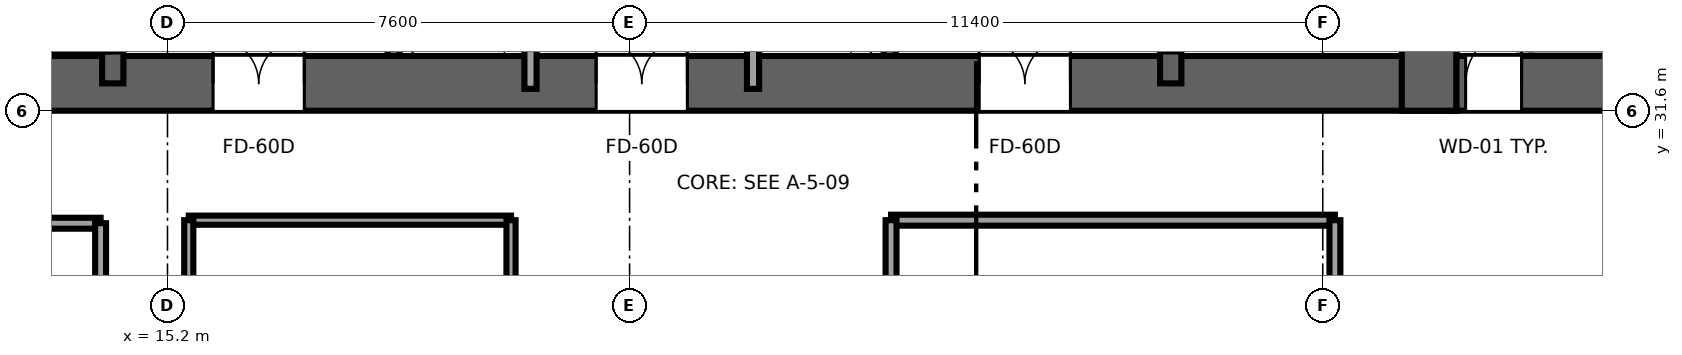
"""IFC4 building model, lengths in metres.
Left out: names, types, materials, properties, quantities, classifications, styles, units other than length and angle.
Written with IfcOpenShell. Run it as: python <this file> out.ifc"""

import sys

from ifc_helpers import new_model, si_unit, direction, frame, frame_2d, origin, place, context, subcontext, project, spatial, rectangle, extrude, source, transform, mapped, element, fill, save


model = new_model("IFC4")
c1 = context("Model", 3, precision=1e-05, world=origin(), true_north=direction((0.0, 1.0)))
c2 = subcontext(c1, "Body", "Model", "MODEL_VIEW")
j1 = project(units=[si_unit("LENGTHUNIT", "METRE"), si_unit("PLANEANGLEUNIT", "RADIAN")], contexts=[c1])
p1 = place(None, origin())
s1 = spatial("IfcSite", under=j1, at=p1, CompositionType="ELEMENT")
p2 = place(p1, origin())
s2 = spatial("IfcBuilding", under=s1, at=p2, CompositionType="ELEMENT")
p3 = place(p2, frame((0.0, 0.0, 32.0)))
s3 = spatial("IfcBuildingStorey", under=s2, at=p3, CompositionType="ELEMENT", Elevation=32.0)
p4 = place(p3, frame((9.6, 32.05, 0.0), z_axis=(0.0, 0.0, 1.0), x_axis=(1.0, 0.0, 0.0)))
e1 = element("IfcWall", 1, at=p4, inside=s3, PredefinedType="SHEAR", context=c2, shape_type="SweptSolid", body=[
    extrude(rectangle(XDim=26.8, YDim=0.9, at=frame_2d((13.4, 0.0))), origin(), (0.0, 0.0, 1.0), 3.55),
])
p5 = place(p4, frame((7.85, 0.0, 0.0), z_axis=(0.0, 0.0, 1.0), x_axis=(-1.0, 0.0, 0.0)))
e2 = element("IfcOpeningElement", 2, at=p5, cuts=e1, PredefinedType="OPENING", context=c2, shape_type="SweptSolid", body=[
    extrude(rectangle(XDim=1.5, YDim=2.04, at=frame_2d((0.75, 1.02))), frame((0.0, 0.46, 0.0), z_axis=(0.0, -1.0, 0.0), x_axis=(1.0, 0.0, 0.0)), (0.0, 0.0, 1.0), 0.92),
])
p6 = place(p4, frame((14.15, 0.0, 0.0), z_axis=(0.0, 0.0, 1.0), x_axis=(-1.0, 0.0, 0.0)))
e3 = element("IfcOpeningElement", 3, at=p6, cuts=e1, PredefinedType="OPENING", context=c2, shape_type="SweptSolid", body=[
    extrude(rectangle(XDim=1.5, YDim=2.04, at=frame_2d((0.75, 1.02))), frame((0.0, 0.46, 0.0), z_axis=(0.0, -1.0, 0.0), x_axis=(1.0, 0.0, 0.0)), (0.0, 0.0, 1.0), 0.92),
])
p7 = place(p4, frame((20.45, 0.0, 0.0), z_axis=(0.0, 0.0, 1.0), x_axis=(-1.0, 0.0, 0.0)))
e4 = element("IfcOpeningElement", 4, at=p7, cuts=e1, PredefinedType="OPENING", context=c2, shape_type="SweptSolid", body=[
    extrude(rectangle(XDim=1.5, YDim=2.04, at=frame_2d((0.75, 1.02))), frame((0.0, 0.46, 0.0), z_axis=(0.0, -1.0, 0.0), x_axis=(1.0, 0.0, 0.0)), (0.0, 0.0, 1.0), 0.92),
])
p8 = place(p3, frame((35.95, 31.6, 0.0), z_axis=(0.0, 0.0, 1.0), x_axis=(0.0, 1.0, 0.0)))
e5 = element("IfcWall", 5, at=p8, inside=s3, PredefinedType="SHEAR", context=c2, shape_type="SweptSolid", body=[
    extrude(rectangle(XDim=13.6, YDim=0.9, at=frame_2d((6.8, 0.0))), origin(), (0.0, 0.0, 1.0), 3.55),
])
p9 = place(p3, frame((14.3, 32.05, 0.0), z_axis=(0.0, 0.0, 1.0), x_axis=(0.0, 1.0, 0.0)))
e6 = element("IfcWall", 6, at=p9, inside=s3, PredefinedType="SHEAR", context=c2, shape_type="SweptSolid", body=[
    extrude(rectangle(XDim=12.7, YDim=0.35, at=frame_2d((6.35, 0.0))), origin(), (0.0, 0.0, 1.0), 3.55),
])
p10 = place(p9, frame((0.5, 0.0, 0.0)))
e7 = element("IfcOpeningElement", 7, at=p10, cuts=e6, PredefinedType="OPENING", context=c2, shape_type="SweptSolid", body=[
    extrude(rectangle(XDim=1.1, YDim=2.12, at=frame_2d((0.55, 1.06))), frame((0.0, 0.185, 0.0), z_axis=(0.0, -1.0, 0.0), x_axis=(1.0, 0.0, 0.0)), (0.0, 0.0, 1.0), 0.37),
])
p11 = place(p3, frame((31.7, 32.05, 0.0), z_axis=(0.0, 0.0, 1.0), x_axis=(0.0, 1.0, 0.0)))
e8 = element("IfcWall", 8, at=p11, inside=s3, PredefinedType="SHEAR", context=c2, shape_type="SweptSolid", body=[
    extrude(rectangle(XDim=12.7, YDim=0.35, at=frame_2d((6.35, 0.0))), origin(), (0.0, 0.0, 1.0), 3.55),
])
p12 = place(p11, frame((1.6, 0.0, 0.0), z_axis=(0.0, 0.0, 1.0), x_axis=(-1.0, 0.0, 0.0)))
e9 = element("IfcOpeningElement", 9, at=p12, cuts=e8, PredefinedType="OPENING", context=c2, shape_type="SweptSolid", body=[
    extrude(rectangle(XDim=1.1, YDim=2.12, at=frame_2d((0.55, 1.06))), frame((0.0, 0.185, 0.0), z_axis=(0.0, -1.0, 0.0), x_axis=(1.0, 0.0, 0.0)), (0.0, 0.0, 1.0), 0.37),
])
p13 = place(p3, frame((36.4, 32.05, 0.0), z_axis=(0.0, 0.0, 1.0), x_axis=(1.0, 0.0, 0.0)))
e10 = element("IfcWall", 10, at=p13, inside=s3, PredefinedType="SHEAR", context=c2, shape_type="SweptSolid", body=[
    extrude(rectangle(XDim=4.0, YDim=0.9, at=frame_2d((2.0, 0.0))), origin(), (0.0, 0.0, 1.0), 3.55),
])
p14 = place(p13, frame((1.07, 0.0, 0.0), z_axis=(0.0, 0.0, 1.0), x_axis=(-1.0, 0.0, 0.0)))
e11 = element("IfcOpeningElement", 11, at=p14, cuts=e10, PredefinedType="OPENING", context=c2, shape_type="SweptSolid", body=[
    extrude(rectangle(XDim=0.92, YDim=2.01, at=frame_2d((0.46, 1.005))), frame((0.0, 0.46, 0.0), z_axis=(0.0, -1.0, 0.0), x_axis=(1.0, 0.0, 0.0)), (0.0, 0.0, 1.0), 0.92),
])
for number, where, z_axis, x_axis in (
    (12, (18.92, 32.504, 0.0), (0.0, 0.0, 1.0), (0.0, 1.0, 0.0)),
    (13, (27.08, 32.504, 0.0), (0.0, 0.0, 1.0), (0.0, 1.0, 0.0)),
):
    element("IfcWall", number, at=place(p3, frame(where, z_axis=z_axis, x_axis=x_axis)), inside=s3, PredefinedType="SOLIDWALL", context=c2, shape_type="SweptSolid", body=[
        extrude(rectangle(XDim=3.646, YDim=0.2, at=frame_2d((1.823, 0.0))), origin(), (0.0, 0.0, 1.0), 3.37),
    ])
for number, where, z_axis, x_axis in (
    (14, (21.17, 31.96, 0.0), (0.0, 0.0, 1.0), (0.0, 1.0, 0.0)),
    (15, (24.83, 31.96, 0.0), (0.0, 0.0, 1.0), (0.0, 1.0, 0.0)),
):
    element("IfcWall", number, at=place(p3, frame(where, z_axis=z_axis, x_axis=x_axis)), inside=s3, PredefinedType="SOLIDWALL", context=c2, shape_type="SweptSolid", body=[
        extrude(rectangle(XDim=12.58, YDim=0.2, at=frame_2d((6.29, 0.0))), origin(), (0.0, 0.0, 1.0), 3.37),
    ])
p15 = place(p3, frame((9.88, 29.75, 0.0), z_axis=(0.0, 0.0, 1.0), x_axis=(1.0, 0.0, 0.0)))
e16 = element("IfcWall", 16, at=p15, inside=s3, PredefinedType="PARTITIONING", context=c2, shape_type="SweptSolid", body=[
    extrude(rectangle(XDim=4.22, YDim=0.18, at=frame_2d((2.11, 0.0))), origin(), (0.0, 0.0, 1.0), 3.37),
])
p16 = place(p3, frame((14.1, 23.5, 0.0), z_axis=(0.0, 0.0, 1.0), x_axis=(0.0, 1.0, 0.0)))
e17 = element("IfcWall", 17, at=p16, inside=s3, PredefinedType="PARTITIONING", context=c2, shape_type="SweptSolid", body=[
    extrude(rectangle(XDim=6.25, YDim=0.18, at=frame_2d((3.125, 0.0))), origin(), (0.0, 0.0, 1.0), 3.37),
])
p17 = place(p3, frame((27.1, 29.8, 0.0), z_axis=(0.0, 0.0, 1.0), x_axis=(1.0, 0.0, 0.0)))
e18 = element("IfcWall", 18, at=p17, inside=s3, PredefinedType="PARTITIONING", context=c2, shape_type="SweptSolid", body=[
    extrude(rectangle(XDim=7.3, YDim=0.18, at=frame_2d((3.65, 0.0))), origin(), (0.0, 0.0, 1.0), 3.37),
])
for number, where, z_axis, x_axis in (
    (19, (27.1, 23.5, 0.0), (0.0, 0.0, 1.0), (0.0, 1.0, 0.0)),
    (20, (34.4, 23.5, 0.0), (0.0, 0.0, 1.0), (0.0, 1.0, 0.0)),
):
    element("IfcWall", number, at=place(p3, frame(where, z_axis=z_axis, x_axis=x_axis)), inside=s3, PredefinedType="PARTITIONING", context=c2, shape_type="SweptSolid", body=[
        extrude(rectangle(XDim=6.3, YDim=0.18, at=frame_2d((3.15, 0.0))), origin(), (0.0, 0.0, 1.0), 3.37),
    ])
p18 = place(p3, frame((15.55, 29.8, 0.0), z_axis=(0.0, 0.0, 1.0), x_axis=(1.0, 0.0, 0.0)))
e21 = element("IfcWall", 21, at=p18, inside=s3, PredefinedType="PARTITIONING", context=c2, shape_type="SweptSolid", body=[
    extrude(rectangle(XDim=5.3, YDim=0.15, at=frame_2d((2.65, 0.0))), origin(), (0.0, 0.0, 1.0), 3.37),
])
for number, where, z_axis, x_axis in (
    (22, (15.55, 23.5, 0.0), (0.0, 0.0, 1.0), (0.0, 1.0, 0.0)),
    (23, (20.85, 23.5, 0.0), (0.0, 0.0, 1.0), (0.0, 1.0, 0.0)),
):
    element("IfcWall", number, at=place(p3, frame(where, z_axis=z_axis, x_axis=x_axis)), inside=s3, PredefinedType="PARTITIONING", context=c2, shape_type="SweptSolid", body=[
        extrude(rectangle(XDim=6.3, YDim=0.15, at=frame_2d((3.15, 0.0))), origin(), (0.0, 0.0, 1.0), 3.37),
    ])
m1 = source(origin(), c2, "Body", "SweptSolid", [
    extrude(rectangle(XDim=1.1, YDim=2.12, at=frame_2d((0.55, 1.06))), frame((0.0, 0.025, 0.0), z_axis=(0.0, -1.0, 0.0), x_axis=(1.0, 0.0, 0.0)), (0.0, 0.0, 1.0), 0.05),
])
p19 = place(p10, origin())
e24 = element("IfcDoor", 24, at=p19, inside=s3, OperationType="SINGLE_SWING_LEFT", PredefinedType="DOOR", context=c2, shape_type="MappedRepresentation", body=[
    mapped(m1, transform((0.0, 0.0, 0.0), x_axis=(1.0, 0.0, 0.0), y_axis=(0.0, 1.0, 0.0), z_axis=(0.0, 0.0, 1.0), scale=1.0)),
])
fill(e7, e24)
p20 = place(p12, origin())
e25 = element("IfcDoor", 25, at=p20, inside=s3, OperationType="SINGLE_SWING_RIGHT", PredefinedType="DOOR", context=c2, shape_type="MappedRepresentation", body=[
    mapped(m1, transform((0.0, 0.0, 0.0), x_axis=(1.0, 0.0, 0.0), y_axis=(0.0, 1.0, 0.0), z_axis=(0.0, 0.0, 1.0), scale=1.0)),
])
fill(e9, e25)
m2 = source(origin(), c2, "Body", "SweptSolid", [
    extrude(rectangle(XDim=1.5, YDim=2.04, at=frame_2d((0.75, 1.02))), frame((0.0, 0.025, 0.0), z_axis=(0.0, -1.0, 0.0), x_axis=(1.0, 0.0, 0.0)), (0.0, 0.0, 1.0), 0.05),
])
p21 = place(p5, origin())
e26 = element("IfcDoor", 26, at=p21, inside=s3, OperationType="DOUBLE_DOOR_SINGLE_SWING", PredefinedType="DOOR", context=c2, shape_type="MappedRepresentation", body=[
    mapped(m2, transform((0.0, 0.0, 0.0), x_axis=(1.0, 0.0, 0.0), y_axis=(0.0, 1.0, 0.0), z_axis=(0.0, 0.0, 1.0), scale=1.0)),
])
fill(e2, e26)
p22 = place(p6, origin())
e27 = element("IfcDoor", 27, at=p22, inside=s3, OperationType="DOUBLE_DOOR_SINGLE_SWING", PredefinedType="DOOR", context=c2, shape_type="MappedRepresentation", body=[
    mapped(m2, transform((0.0, 0.0, 0.0), x_axis=(1.0, 0.0, 0.0), y_axis=(0.0, 1.0, 0.0), z_axis=(0.0, 0.0, 1.0), scale=1.0)),
])
fill(e3, e27)
p23 = place(p7, origin())
e28 = element("IfcDoor", 28, at=p23, inside=s3, OperationType="DOUBLE_DOOR_SINGLE_SWING", PredefinedType="DOOR", context=c2, shape_type="MappedRepresentation", body=[
    mapped(m2, transform((0.0, 0.0, 0.0), x_axis=(1.0, 0.0, 0.0), y_axis=(0.0, 1.0, 0.0), z_axis=(0.0, 0.0, 1.0), scale=1.0)),
])
fill(e4, e28)
m3 = source(origin(), c2, "Body", "SweptSolid", [
    extrude(rectangle(XDim=0.92, YDim=2.01, at=frame_2d((0.46, 1.005))), frame((0.0, 0.025, 0.0), z_axis=(0.0, -1.0, 0.0), x_axis=(1.0, 0.0, 0.0)), (0.0, 0.0, 1.0), 0.05),
])
p24 = place(p14, origin())
e29 = element("IfcDoor", 29, at=p24, inside=s3, OperationType="SINGLE_SWING_RIGHT", PredefinedType="DOOR", context=c2, shape_type="MappedRepresentation", body=[
    mapped(m3, transform((0.0, 0.0, 0.0), x_axis=(1.0, 0.0, 0.0), y_axis=(0.0, 1.0, 0.0), z_axis=(0.0, 0.0, 1.0), scale=1.0)),
])
fill(e11, e29)
save(model, sys.argv[1])
